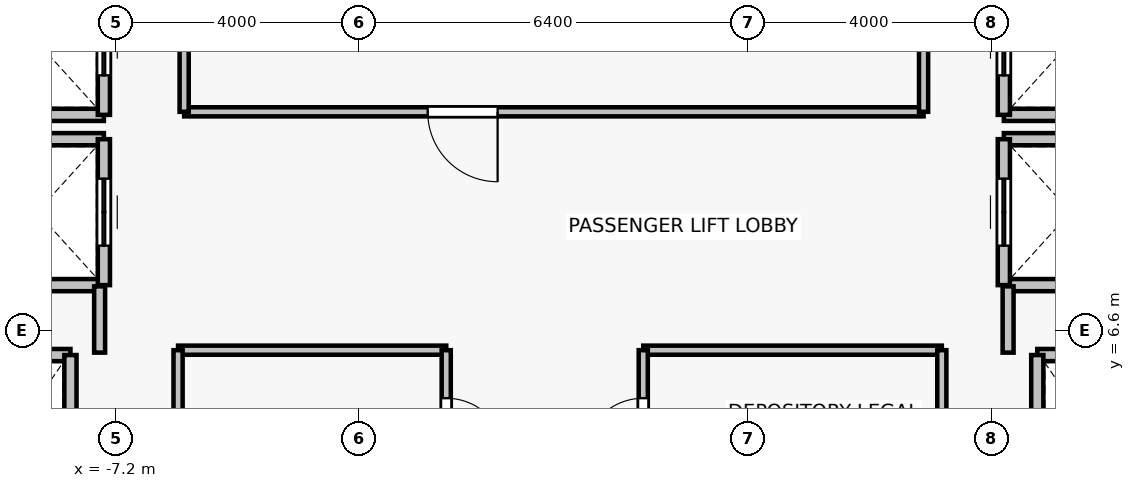
"""IFC4 building model, lengths in metres.
Left out: names, types, materials, properties, quantities, classifications, styles, units other than length and angle.
Written with IfcOpenShell. Run it as: python <this file> out.ifc"""

import sys

from ifc_helpers import new_model, si_unit, direction, frame, frame_2d, origin, place, context, subcontext, project, spatial, rectangle, extrude, source, transform, mapped, element, fill, save


model = new_model("IFC4")
c1 = context("Model", 3, precision=1e-05, world=origin(), true_north=direction((0.0, 1.0)))
c2 = subcontext(c1, "Body", "Model", "MODEL_VIEW")
j1 = project(units=[si_unit("LENGTHUNIT", "METRE"), si_unit("PLANEANGLEUNIT", "RADIAN")], contexts=[c1])
p1 = place(None, origin())
s1 = spatial("IfcSite", under=j1, at=p1, CompositionType="ELEMENT")
p2 = place(p1, origin())
s2 = spatial("IfcBuilding", under=s1, at=p2, CompositionType="ELEMENT")
p3 = place(p2, frame((0.0, 0.0, 205.6)))
s3 = spatial("IfcBuildingStorey", under=s2, at=p3, CompositionType="ELEMENT", Elevation=205.6)
p4 = place(p3, frame((-9.95, 6.2, 0.0), z_axis=(0.0, 0.0, 1.0), x_axis=(1.0, 0.0, 0.0)))
e1 = element("IfcWall", 1, at=p4, inside=s3, PredefinedType="SOLIDWALL", context=c2, shape_type="SweptSolid", body=[
    extrude(rectangle(XDim=2.0, YDim=0.2, at=frame_2d((1.0, 0.0))), origin(), (0.0, 0.0, 1.0), 3.075),
])
p5 = place(p3, frame((-7.95, 6.2, 0.0), z_axis=(0.0, 0.0, 1.0), x_axis=(0.0, -1.0, 0.0)))
e2 = element("IfcWall", 2, at=p5, inside=s3, PredefinedType="SOLIDWALL", context=c2, shape_type="SweptSolid", body=[
    extrude(rectangle(XDim=2.8, YDim=0.2, at=frame_2d((1.4, 0.0))), origin(), (0.0, 0.0, 1.0), 3.075),
])
p6 = place(p3, frame((7.95, 6.2, 0.0), z_axis=(0.0, 0.0, 1.0), x_axis=(1.0, 0.0, 0.0)))
e3 = element("IfcWall", 3, at=p6, inside=s3, PredefinedType="SOLIDWALL", context=c2, shape_type="SweptSolid", body=[
    extrude(rectangle(XDim=2.0, YDim=0.2, at=frame_2d((1.0, 0.0))), origin(), (0.0, 0.0, 1.0), 3.075),
])
p7 = place(p3, frame((7.95, 3.4, 0.0), z_axis=(0.0, 0.0, 1.0), x_axis=(0.0, 1.0, 0.0)))
e4 = element("IfcWall", 4, at=p7, inside=s3, PredefinedType="SOLIDWALL", context=c2, shape_type="SweptSolid", body=[
    extrude(rectangle(XDim=2.8, YDim=0.2, at=frame_2d((1.4, 0.0))), origin(), (0.0, 0.0, 1.0), 3.075),
])
for number, where, z_axis, x_axis in (
    (5, (-7.4, 7.35, 0.0), (0.0, 0.0, 1.0), (-1.0, 0.0, 0.0)),
    (6, (-9.6, 9.75, 0.0), (0.0, 0.0, 1.0), (1.0, 0.0, 0.0)),
):
    element("IfcWall", number, at=place(p3, frame(where, z_axis=z_axis, x_axis=x_axis)), inside=s3, PredefinedType="SOLIDWALL", context=c2, shape_type="SweptSolid", body=[
        extrude(rectangle(XDim=2.2, YDim=0.2, at=frame_2d((1.1, 0.0))), origin(), (0.0, 0.0, 1.0), 2.615),
    ])
p8 = place(p3, frame((-7.4, 9.75, 0.0), z_axis=(0.0, 0.0, 1.0), x_axis=(0.0, -1.0, 0.0)))
e7 = element("IfcWall", 7, at=p8, inside=s3, PredefinedType="SOLIDWALL", context=c2, shape_type="SweptSolid", body=[
    extrude(rectangle(XDim=2.4, YDim=0.2, at=frame_2d((1.2, 0.0))), origin(), (0.0, 0.0, 1.0), 2.615),
])
p9 = place(p8, frame((0.65, 0.0, 0.0)))
e8 = element("IfcOpeningElement", 8, at=p9, cuts=e7, PredefinedType="OPENING", context=c2, shape_type="SweptSolid", body=[
    extrude(rectangle(XDim=1.1, YDim=2.2, at=frame_2d((0.55, 1.1))), frame((0.0, 0.11, 0.0), z_axis=(0.0, -1.0, 0.0), x_axis=(1.0, 0.0, 0.0)), (0.0, 0.0, 1.0), 0.22),
])
p10 = place(p3, frame((-7.4, 10.15, 0.0), z_axis=(0.0, 0.0, 1.0), x_axis=(-1.0, 0.0, 0.0)))
e9 = element("IfcWall", 9, at=p10, inside=s3, PredefinedType="SOLIDWALL", context=c2, shape_type="SweptSolid", body=[
    extrude(rectangle(XDim=2.2, YDim=0.2, at=frame_2d((1.1, 0.0))), origin(), (0.0, 0.0, 1.0), 2.615),
])
p11 = place(p3, frame((-7.4, 12.55, 0.0), z_axis=(0.0, 0.0, 1.0), x_axis=(0.0, -1.0, 0.0)))
e10 = element("IfcWall", 10, at=p11, inside=s3, PredefinedType="SOLIDWALL", context=c2, shape_type="SweptSolid", body=[
    extrude(rectangle(XDim=2.4, YDim=0.2, at=frame_2d((1.2, 0.0))), origin(), (0.0, 0.0, 1.0), 2.615),
])
p12 = place(p11, frame((0.65, 0.0, 0.0)))
e11 = element("IfcOpeningElement", 11, at=p12, cuts=e10, PredefinedType="OPENING", context=c2, shape_type="SweptSolid", body=[
    extrude(rectangle(XDim=1.1, YDim=2.2, at=frame_2d((0.55, 1.1))), frame((0.0, 0.11, 0.0), z_axis=(0.0, -1.0, 0.0), x_axis=(1.0, 0.0, 0.0)), (0.0, 0.0, 1.0), 0.22),
])
for number, where, z_axis, x_axis in (
    (12, (9.6, 7.35, 0.0), (0.0, 0.0, 1.0), (-1.0, 0.0, 0.0)),
    (13, (7.4, 9.75, 0.0), (0.0, 0.0, 1.0), (1.0, 0.0, 0.0)),
):
    element("IfcWall", number, at=place(p3, frame(where, z_axis=z_axis, x_axis=x_axis)), inside=s3, PredefinedType="SOLIDWALL", context=c2, shape_type="SweptSolid", body=[
        extrude(rectangle(XDim=2.2, YDim=0.2, at=frame_2d((1.1, 0.0))), origin(), (0.0, 0.0, 1.0), 2.615),
    ])
p13 = place(p3, frame((7.4, 7.35, 0.0), z_axis=(0.0, 0.0, 1.0), x_axis=(0.0, 1.0, 0.0)))
e14 = element("IfcWall", 14, at=p13, inside=s3, PredefinedType="SOLIDWALL", context=c2, shape_type="SweptSolid", body=[
    extrude(rectangle(XDim=2.4, YDim=0.2, at=frame_2d((1.2, 0.0))), origin(), (0.0, 0.0, 1.0), 2.615),
])
p14 = place(p13, frame((0.65, 0.0, 0.0)))
e15 = element("IfcOpeningElement", 15, at=p14, cuts=e14, PredefinedType="OPENING", context=c2, shape_type="SweptSolid", body=[
    extrude(rectangle(XDim=1.1, YDim=2.2, at=frame_2d((0.55, 1.1))), frame((0.0, 0.11, 0.0), z_axis=(0.0, -1.0, 0.0), x_axis=(1.0, 0.0, 0.0)), (0.0, 0.0, 1.0), 0.22),
])
p15 = place(p3, frame((9.6, 10.15, 0.0), z_axis=(0.0, 0.0, 1.0), x_axis=(-1.0, 0.0, 0.0)))
e16 = element("IfcWall", 16, at=p15, inside=s3, PredefinedType="SOLIDWALL", context=c2, shape_type="SweptSolid", body=[
    extrude(rectangle(XDim=2.2, YDim=0.2, at=frame_2d((1.1, 0.0))), origin(), (0.0, 0.0, 1.0), 2.615),
])
p16 = place(p3, frame((7.4, 10.15, 0.0), z_axis=(0.0, 0.0, 1.0), x_axis=(0.0, 1.0, 0.0)))
e17 = element("IfcWall", 17, at=p16, inside=s3, PredefinedType="SOLIDWALL", context=c2, shape_type="SweptSolid", body=[
    extrude(rectangle(XDim=2.4, YDim=0.2, at=frame_2d((1.2, 0.0))), origin(), (0.0, 0.0, 1.0), 2.615),
])
p17 = place(p16, frame((0.65, 0.0, 0.0)))
e18 = element("IfcOpeningElement", 18, at=p17, cuts=e17, PredefinedType="OPENING", context=c2, shape_type="SweptSolid", body=[
    extrude(rectangle(XDim=1.1, YDim=2.2, at=frame_2d((0.55, 1.1))), frame((0.0, 0.11, 0.0), z_axis=(0.0, -1.0, 0.0), x_axis=(1.0, 0.0, 0.0)), (0.0, 0.0, 1.0), 0.22),
])
for number, where, z_axis, x_axis in (
    (19, (-7.47, 7.33, 0.0), (0.0, 0.0, 1.0), (0.0, -1.0, 0.0)),
    (20, (7.47, 6.24, 0.0), (0.0, 0.0, 1.0), (0.0, 1.0, 0.0)),
):
    element("IfcWall", number, at=place(p3, frame(where, z_axis=z_axis, x_axis=x_axis)), inside=s3, PredefinedType="PARTITIONING", context=c2, shape_type="SweptSolid", body=[
        extrude(rectangle(XDim=1.09, YDim=0.18, at=frame_2d((0.545, 0.0))), origin(), (0.0, 0.0, 1.0), 2.615),
    ])
p18 = place(p3, frame((6.08, 10.2, 0.0), z_axis=(0.0, 0.0, 1.0), x_axis=(-1.0, 0.0, 0.0)))
e21 = element("IfcWall", 21, at=p18, inside=s3, PredefinedType="PARTITIONING", context=c2, shape_type="SweptSolid", body=[
    extrude(rectangle(XDim=12.16, YDim=0.15, at=frame_2d((6.08, 0.0))), origin(), (0.0, 0.0, 1.0), 2.59),
])
p19 = place(p18, frame((7.005, 0.0, 0.0)))
e22 = element("IfcOpeningElement", 22, at=p19, cuts=e21, PredefinedType="OPENING", context=c2, shape_type="SweptSolid", body=[
    extrude(rectangle(XDim=1.15, YDim=2.15, at=frame_2d((0.575, 1.075))), frame((0.0, 0.085, 0.0), z_axis=(0.0, -1.0, 0.0), x_axis=(1.0, 0.0, 0.0)), (0.0, 0.0, 1.0), 0.17),
])
for number, where, z_axis, x_axis in (
    (23, (-6.08, 10.2, 0.0), (0.0, 0.0, 1.0), (0.0, 1.0, 0.0)),
    (24, (6.08, 13.0, 0.0), (0.0, 0.0, 1.0), (0.0, -1.0, 0.0)),
):
    element("IfcWall", number, at=place(p3, frame(where, z_axis=z_axis, x_axis=x_axis)), inside=s3, PredefinedType="PARTITIONING", context=c2, shape_type="SweptSolid", body=[
        extrude(rectangle(XDim=2.8, YDim=0.15, at=frame_2d((1.4, 0.0))), origin(), (0.0, 0.0, 1.0), 3.075),
    ])
p20 = place(p3, frame((-6.18, 6.28, 0.0), z_axis=(0.0, 0.0, 1.0), x_axis=(1.0, 0.0, 0.0)))
e25 = element("IfcWall", 25, at=p20, inside=s3, PredefinedType="PARTITIONING", context=c2, shape_type="SweptSolid", body=[
    extrude(rectangle(XDim=4.41, YDim=0.15, at=frame_2d((2.205, 0.0))), origin(), (0.0, 0.0, 1.0), 3.075),
])
p21 = place(p3, frame((-6.18, 3.76, 0.0), z_axis=(0.0, 0.0, 1.0), x_axis=(0.0, 1.0, 0.0)))
e26 = element("IfcWall", 26, at=p21, inside=s3, PredefinedType="PARTITIONING", context=c2, shape_type="SweptSolid", body=[
    extrude(rectangle(XDim=2.52, YDim=0.15, at=frame_2d((1.26, 0.0))), origin(), (0.0, 0.0, 1.0), 3.075),
])
p22 = place(p3, frame((-1.77, 6.28, 0.0), z_axis=(0.0, 0.0, 1.0), x_axis=(0.0, -1.0, 0.0)))
e27 = element("IfcWall", 27, at=p22, inside=s3, PredefinedType="PARTITIONING", context=c2, shape_type="SweptSolid", body=[
    extrude(rectangle(XDim=2.52, YDim=0.15, at=frame_2d((1.26, 0.0))), origin(), (0.0, 0.0, 1.0), 3.075),
])
p23 = place(p22, frame((0.79, 0.0, 0.0)))
e28 = element("IfcOpeningElement", 28, at=p23, cuts=e27, PredefinedType="OPENING", context=c2, shape_type="SweptSolid", body=[
    extrude(rectangle(XDim=0.98, YDim=2.15, at=frame_2d((0.49, 1.075))), frame((0.0, 0.085, 0.0), z_axis=(0.0, -1.0, 0.0), x_axis=(1.0, 0.0, 0.0)), (0.0, 0.0, 1.0), 0.17),
])
p24 = place(p3, frame((1.47, 6.28, 0.0), z_axis=(0.0, 0.0, 1.0), x_axis=(1.0, 0.0, 0.0)))
e29 = element("IfcWall", 29, at=p24, inside=s3, PredefinedType="PARTITIONING", context=c2, shape_type="SweptSolid", body=[
    extrude(rectangle(XDim=4.91, YDim=0.15, at=frame_2d((2.455, 0.0))), origin(), (0.0, 0.0, 1.0), 3.075),
])
p25 = place(p3, frame((1.47, 3.76, 0.0), z_axis=(0.0, 0.0, 1.0), x_axis=(0.0, 1.0, 0.0)))
e30 = element("IfcWall", 30, at=p25, inside=s3, PredefinedType="PARTITIONING", context=c2, shape_type="SweptSolid", body=[
    extrude(rectangle(XDim=2.52, YDim=0.15, at=frame_2d((1.26, 0.0))), origin(), (0.0, 0.0, 1.0), 3.075),
])
p26 = place(p25, frame((0.75, 0.0, 0.0)))
e31 = element("IfcOpeningElement", 31, at=p26, cuts=e30, PredefinedType="OPENING", context=c2, shape_type="SweptSolid", body=[
    extrude(rectangle(XDim=0.98, YDim=2.15, at=frame_2d((0.49, 1.075))), frame((0.0, 0.085, 0.0), z_axis=(0.0, -1.0, 0.0), x_axis=(1.0, 0.0, 0.0)), (0.0, 0.0, 1.0), 0.17),
])
p27 = place(p3, frame((6.38, 6.28, 0.0), z_axis=(0.0, 0.0, 1.0), x_axis=(0.0, -1.0, 0.0)))
e32 = element("IfcWall", 32, at=p27, inside=s3, PredefinedType="PARTITIONING", context=c2, shape_type="SweptSolid", body=[
    extrude(rectangle(XDim=2.52, YDim=0.15, at=frame_2d((1.26, 0.0))), origin(), (0.0, 0.0, 1.0), 3.075),
])
m1 = source(origin(), c2, "Body", "SweptSolid", [
    extrude(rectangle(XDim=1.1, YDim=2.2, at=frame_2d((0.55, 1.1))), frame((0.0, 0.025, 0.0), z_axis=(0.0, -1.0, 0.0), x_axis=(1.0, 0.0, 0.0)), (0.0, 0.0, 1.0), 0.05),
])
p28 = place(p9, origin())
e33 = element("IfcDoor", 33, at=p28, inside=s3, OperationType="DOUBLE_DOOR_SLIDING", PredefinedType="DOOR", context=c2, shape_type="MappedRepresentation", body=[
    mapped(m1, transform((0.0, 0.0, 0.0), x_axis=(1.0, 0.0, 0.0), y_axis=(0.0, 1.0, 0.0), z_axis=(0.0, 0.0, 1.0), scale=1.0)),
])
fill(e8, e33)
p29 = place(p12, origin())
e34 = element("IfcDoor", 34, at=p29, inside=s3, OperationType="DOUBLE_DOOR_SLIDING", PredefinedType="DOOR", context=c2, shape_type="MappedRepresentation", body=[
    mapped(m1, transform((0.0, 0.0, 0.0), x_axis=(1.0, 0.0, 0.0), y_axis=(0.0, 1.0, 0.0), z_axis=(0.0, 0.0, 1.0), scale=1.0)),
])
fill(e11, e34)
p30 = place(p14, origin())
e35 = element("IfcDoor", 35, at=p30, inside=s3, OperationType="DOUBLE_DOOR_SLIDING", PredefinedType="DOOR", context=c2, shape_type="MappedRepresentation", body=[
    mapped(m1, transform((0.0, 0.0, 0.0), x_axis=(1.0, 0.0, 0.0), y_axis=(0.0, 1.0, 0.0), z_axis=(0.0, 0.0, 1.0), scale=1.0)),
])
fill(e15, e35)
p31 = place(p17, origin())
e36 = element("IfcDoor", 36, at=p31, inside=s3, OperationType="DOUBLE_DOOR_SLIDING", PredefinedType="DOOR", context=c2, shape_type="MappedRepresentation", body=[
    mapped(m1, transform((0.0, 0.0, 0.0), x_axis=(1.0, 0.0, 0.0), y_axis=(0.0, 1.0, 0.0), z_axis=(0.0, 0.0, 1.0), scale=1.0)),
])
fill(e18, e36)
m2 = source(origin(), c2, "Body", "SweptSolid", [
    extrude(rectangle(XDim=1.15, YDim=2.15, at=frame_2d((0.575, 1.075))), frame((0.0, 0.025, 0.0), z_axis=(0.0, -1.0, 0.0), x_axis=(1.0, 0.0, 0.0)), (0.0, 0.0, 1.0), 0.05),
])
p32 = place(p19, origin())
e37 = element("IfcDoor", 37, at=p32, inside=s3, OperationType="SINGLE_SWING_LEFT", PredefinedType="DOOR", context=c2, shape_type="MappedRepresentation", body=[
    mapped(m2, transform((0.0, 0.0, 0.0), x_axis=(1.0, 0.0, 0.0), y_axis=(0.0, 1.0, 0.0), z_axis=(0.0, 0.0, 1.0), scale=1.0)),
])
fill(e22, e37)
m3 = source(origin(), c2, "Body", "SweptSolid", [
    extrude(rectangle(XDim=0.98, YDim=2.15, at=frame_2d((0.49, 1.075))), frame((0.0, 0.025, 0.0), z_axis=(0.0, -1.0, 0.0), x_axis=(1.0, 0.0, 0.0)), (0.0, 0.0, 1.0), 0.05),
])
p33 = place(p23, origin())
e38 = element("IfcDoor", 38, at=p33, inside=s3, OperationType="SINGLE_SWING_RIGHT", PredefinedType="DOOR", context=c2, shape_type="MappedRepresentation", body=[
    mapped(m3, transform((0.0, 0.0, 0.0), x_axis=(1.0, 0.0, 0.0), y_axis=(0.0, 1.0, 0.0), z_axis=(0.0, 0.0, 1.0), scale=1.0)),
])
fill(e28, e38)
p34 = place(p26, origin())
e39 = element("IfcDoor", 39, at=p34, inside=s3, OperationType="SINGLE_SWING_LEFT", PredefinedType="DOOR", context=c2, shape_type="MappedRepresentation", body=[
    mapped(m3, transform((0.0, 0.0, 0.0), x_axis=(1.0, 0.0, 0.0), y_axis=(0.0, 1.0, 0.0), z_axis=(0.0, 0.0, 1.0), scale=1.0)),
])
fill(e31, e39)
save(model, sys.argv[1])
